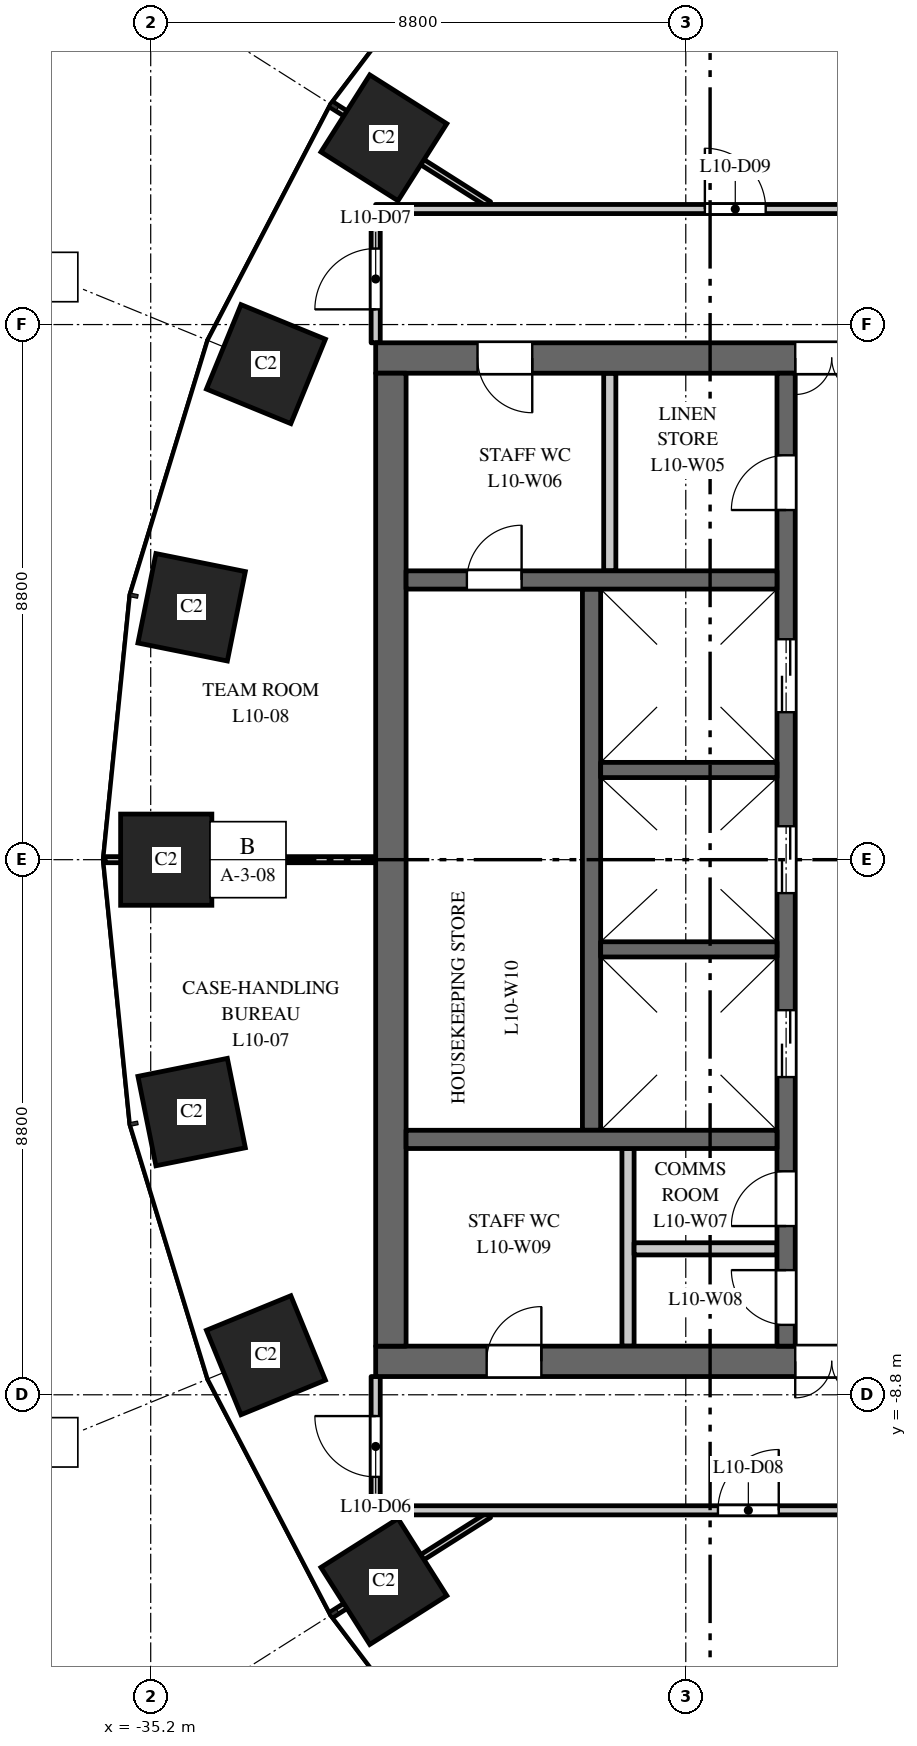
"""IFC4 building model, lengths in metres.
Left out: names, types, materials, properties, quantities, classifications, styles, units other than length and angle.
Written with IfcOpenShell. Run it as: python <this file> out.ifc"""

import sys

from ifc_helpers import new_model, si_unit, direction, frame, frame_2d, origin, origin_2d, place, context, subcontext, project, spatial, rectangle, extrude, element, fill, save


model = new_model("IFC4")
c1 = context("Model", 3, precision=1e-05, world=origin(), true_north=direction((0.0, 1.0)))
c2 = subcontext(c1, "Body", "Model", "MODEL_VIEW")
j1 = project(units=[si_unit("LENGTHUNIT", "METRE"), si_unit("PLANEANGLEUNIT", "RADIAN")], contexts=[c1])
p1 = place(None, origin())
s1 = spatial("IfcSite", under=j1, at=p1, CompositionType="ELEMENT")
p2 = place(p1, origin())
s2 = spatial("IfcBuilding", under=s1, at=p2, CompositionType="ELEMENT")
p3 = place(p2, frame((0.0, 0.0, 50.5)))
s3 = spatial("IfcBuildingStorey", under=s2, at=p3, CompositionType="ELEMENT", Elevation=50.5)
for number, where, z_axis, x_axis in (
    (1, (-31.365, 11.871, 0.0), (0.0, 0.0, 1.0), (-0.535, -0.845, 0.0)),
    (2, (-33.305, 8.149, 0.0), (0.0, 0.0, 1.0), (-0.379, -0.925, 0.0)),
    (3, (-34.527, 4.151, 0.0), (0.0, 0.0, 1.0), (-0.197, -0.98, 0.0)),
    (4, (-34.945, 0.0, 0.0), (0.0, 0.0, 1.0), (0.0, -1.0, 0.0)),
    (5, (-34.527, -4.151, 0.0), (0.0, 0.0, 1.0), (0.197, -0.98, 0.0)),
    (6, (-33.305, -8.149, 0.0), (0.0, 0.0, 1.0), (0.379, -0.925, 0.0)),
    (7, (-31.365, -11.871, 0.0), (0.0, 0.0, 1.0), (0.535, -0.845, 0.0)),
):
    element("IfcColumn", number, at=place(p3, frame(where, z_axis=z_axis, x_axis=x_axis)), inside=s3, PredefinedType="COLUMN", context=c2, shape_type="SweptSolid", body=[
        extrude(rectangle(XDim=1.5, YDim=1.5, at=origin_2d()), origin(), (0.0, 0.0, 1.0), 4.0),
    ])
p4 = place(p3, frame((-16.5, 8.25, 0.0), z_axis=(0.0, 0.0, 1.0), x_axis=(-1.0, 0.0, 0.0)))
e8 = element("IfcWall", 8, at=p4, inside=s3, PredefinedType="SHEAR", context=c2, shape_type="SweptSolid", body=[
    extrude(rectangle(XDim=15.0, YDim=0.5, at=frame_2d((7.5, 0.0))), origin(), (0.0, 0.0, 1.0), 3.7),
])
p5 = place(p4, frame((6.9, 0.0, 0.0)))
e9 = element("IfcOpeningElement", 9, at=p5, cuts=e8, PredefinedType="OPENING", context=c2, shape_type="SweptSolid", body=[
    extrude(rectangle(XDim=1.2, YDim=2.1, at=frame_2d((0.6, 1.05))), frame((0.0, 0.26, 0.0), z_axis=(0.0, -1.0, 0.0), x_axis=(1.0, 0.0, 0.0)), (0.0, 0.0, 1.0), 0.52),
])
p6 = place(p4, frame((12.425, 0.0, 0.0)))
e10 = element("IfcOpeningElement", 10, at=p6, cuts=e8, PredefinedType="OPENING", context=c2, shape_type="SweptSolid", body=[
    extrude(rectangle(XDim=0.9, YDim=2.1, at=frame_2d((0.45, 1.05))), frame((0.0, 0.26, 0.0), z_axis=(0.0, -1.0, 0.0), x_axis=(1.0, 0.0, 0.0)), (0.0, 0.0, 1.0), 0.52),
])
p7 = place(p3, frame((-16.5, -8.25, 0.0), z_axis=(0.0, 0.0, 1.0), x_axis=(-1.0, 0.0, 0.0)))
e11 = element("IfcWall", 11, at=p7, inside=s3, PredefinedType="SHEAR", context=c2, shape_type="SweptSolid", body=[
    extrude(rectangle(XDim=15.0, YDim=0.5, at=frame_2d((7.5, 0.0))), origin(), (0.0, 0.0, 1.0), 3.7),
])
p8 = place(p7, frame((6.9, 0.0, 0.0)))
e12 = element("IfcOpeningElement", 12, at=p8, cuts=e11, PredefinedType="OPENING", context=c2, shape_type="SweptSolid", body=[
    extrude(rectangle(XDim=1.2, YDim=2.1, at=frame_2d((0.6, 1.05))), frame((0.0, 0.26, 0.0), z_axis=(0.0, -1.0, 0.0), x_axis=(1.0, 0.0, 0.0)), (0.0, 0.0, 1.0), 0.52),
])
p9 = place(p7, frame((12.275, 0.0, 0.0)))
e13 = element("IfcOpeningElement", 13, at=p9, cuts=e11, PredefinedType="OPENING", context=c2, shape_type="SweptSolid", body=[
    extrude(rectangle(XDim=0.9, YDim=2.1, at=frame_2d((0.45, 1.05))), frame((0.0, 0.26, 0.0), z_axis=(0.0, -1.0, 0.0), x_axis=(1.0, 0.0, 0.0)), (0.0, 0.0, 1.0), 0.52),
])
p10 = place(p3, frame((-27.95, -4.45, 0.0), z_axis=(0.0, 0.0, 1.0), x_axis=(0.0, 1.0, 0.0)))
e14 = element("IfcWall", 14, at=p10, inside=s3, PredefinedType="SHEAR", context=c2, shape_type="SweptSolid", body=[
    extrude(rectangle(XDim=8.9, YDim=0.3, at=frame_2d((4.45, 0.0))), origin(), (0.0, 0.0, 1.0), 3.7),
])
p11 = place(p3, frame((-24.75, -8.0, 0.0), z_axis=(0.0, 0.0, 1.0), x_axis=(0.0, 1.0, 0.0)))
e15 = element("IfcWall", 15, at=p11, inside=s3, PredefinedType="SHEAR", context=c2, shape_type="SweptSolid", body=[
    extrude(rectangle(XDim=16.0, YDim=0.3, at=frame_2d((8.0, 0.0))), origin(), (0.0, 0.0, 1.0), 3.7),
])
p12 = place(p11, frame((4.425, 0.0, 0.0)))
e16 = element("IfcOpeningElement", 16, at=p12, cuts=e15, PredefinedType="OPENING", context=c2, shape_type="SweptSolid", body=[
    extrude(rectangle(XDim=1.1, YDim=2.1, at=frame_2d((0.55, 1.05))), frame((0.0, 0.16, 0.0), z_axis=(0.0, -1.0, 0.0), x_axis=(1.0, 0.0, 0.0)), (0.0, 0.0, 1.0), 0.32),
])
p13 = place(p11, frame((7.45, 0.0, 0.0)))
e17 = element("IfcOpeningElement", 17, at=p13, cuts=e15, PredefinedType="OPENING", context=c2, shape_type="SweptSolid", body=[
    extrude(rectangle(XDim=1.1, YDim=2.1, at=frame_2d((0.55, 1.05))), frame((0.0, 0.16, 0.0), z_axis=(0.0, -1.0, 0.0), x_axis=(1.0, 0.0, 0.0)), (0.0, 0.0, 1.0), 0.32),
])
p14 = place(p11, frame((10.425, 0.0, 0.0)))
e18 = element("IfcOpeningElement", 18, at=p14, cuts=e15, PredefinedType="OPENING", context=c2, shape_type="SweptSolid", body=[
    extrude(rectangle(XDim=1.2, YDim=2.1, at=frame_2d((0.6, 1.05))), frame((0.0, 0.16, 0.0), z_axis=(0.0, -1.0, 0.0), x_axis=(1.0, 0.0, 0.0)), (0.0, 0.0, 1.0), 0.32),
])
p15 = place(p11, frame((13.75, 0.0, 0.0)))
e19 = element("IfcOpeningElement", 19, at=p15, cuts=e15, PredefinedType="OPENING", context=c2, shape_type="SweptSolid", body=[
    extrude(rectangle(XDim=0.9, YDim=2.1, at=frame_2d((0.45, 1.05))), frame((0.0, 0.16, 0.0), z_axis=(0.0, -1.0, 0.0), x_axis=(1.0, 0.0, 0.0)), (0.0, 0.0, 1.0), 0.32),
])
p16 = place(p11, frame((1.975, 0.0, 0.0)))
e20 = element("IfcOpeningElement", 20, at=p16, cuts=e15, PredefinedType="OPENING", context=c2, shape_type="SweptSolid", body=[
    extrude(rectangle(XDim=0.9, YDim=2.1, at=frame_2d((0.45, 1.05))), frame((0.0, 0.16, 0.0), z_axis=(0.0, -1.0, 0.0), x_axis=(1.0, 0.0, 0.0)), (0.0, 0.0, 1.0), 0.32),
])
p17 = place(p11, frame((0.35, 0.0, 0.0)))
e21 = element("IfcOpeningElement", 21, at=p17, cuts=e15, PredefinedType="OPENING", context=c2, shape_type="SweptSolid", body=[
    extrude(rectangle(XDim=0.9, YDim=2.1, at=frame_2d((0.45, 1.05))), frame((0.0, 0.16, 0.0), z_axis=(0.0, -1.0, 0.0), x_axis=(1.0, 0.0, 0.0)), (0.0, 0.0, 1.0), 0.32),
])
p18 = place(p3, frame((-31.25, -8.0, 0.0), z_axis=(0.0, 0.0, 1.0), x_axis=(0.0, 1.0, 0.0)))
e22 = element("IfcWall", 22, at=p18, inside=s3, PredefinedType="SHEAR", context=c2, shape_type="SweptSolid", body=[
    extrude(rectangle(XDim=16.0, YDim=0.5, at=frame_2d((8.0, 0.0))), origin(), (0.0, 0.0, 1.0), 3.7),
])
p19 = place(p3, frame((-24.9, 4.6, 0.0), z_axis=(0.0, 0.0, 1.0), x_axis=(-1.0, 0.0, 0.0)))
e23 = element("IfcWall", 23, at=p19, inside=s3, PredefinedType="SHEAR", context=c2, shape_type="SweptSolid", body=[
    extrude(rectangle(XDim=6.1, YDim=0.3, at=frame_2d((3.05, 0.0))), origin(), (0.0, 0.0, 1.0), 3.7),
])
p20 = place(p19, frame((4.2, 0.0, 0.0)))
e24 = element("IfcOpeningElement", 24, at=p20, cuts=e23, PredefinedType="OPENING", context=c2, shape_type="SweptSolid", body=[
    extrude(rectangle(XDim=0.9, YDim=2.1, at=frame_2d((0.45, 1.05))), frame((0.0, 0.16, 0.0), z_axis=(0.0, -1.0, 0.0), x_axis=(1.0, 0.0, 0.0)), (0.0, 0.0, 1.0), 0.32),
])
for number, where, z_axis, x_axis in (
    (25, (-27.65, 4.75, 0.0), (0.0, 0.0, 1.0), (0.0, 1.0, 0.0)),
    (26, (-27.35, -8.0, 0.0), (0.0, 0.0, 1.0), (0.0, 1.0, 0.0)),
):
    element("IfcWall", number, at=place(p3, frame(where, z_axis=z_axis, x_axis=x_axis)), inside=s3, PredefinedType="PARTITIONING", context=c2, shape_type="SweptSolid", body=[
        extrude(rectangle(XDim=3.25, YDim=0.2, at=frame_2d((1.625, 0.0))), origin(), (0.0, 0.0, 1.0), 3.7),
    ])
p21 = place(p3, frame((-24.9, -6.4, 0.0), z_axis=(0.0, 0.0, 1.0), x_axis=(-1.0, 0.0, 0.0)))
e27 = element("IfcWall", 27, at=p21, inside=s3, PredefinedType="PARTITIONING", context=c2, shape_type="SweptSolid", body=[
    extrude(rectangle(XDim=2.35, YDim=0.2, at=frame_2d((1.175, 0.0))), origin(), (0.0, 0.0, 1.0), 3.7),
])
p22 = place(p3, frame((-24.9, -4.6, 0.0), z_axis=(0.0, 0.0, 1.0), x_axis=(-1.0, 0.0, 0.0)))
e28 = element("IfcWall", 28, at=p22, inside=s3, PredefinedType="SHEAR", context=c2, shape_type="SweptSolid", body=[
    extrude(rectangle(XDim=6.1, YDim=0.3, at=frame_2d((3.05, 0.0))), origin(), (0.0, 0.0, 1.0), 3.7),
])
for number, where, z_axis, x_axis in (
    (29, (-24.9, -1.475, 0.0), (0.0, 0.0, 1.0), (-1.0, 0.0, 0.0)),
    (30, (-24.9, 1.475, 0.0), (0.0, 0.0, 1.0), (-1.0, 0.0, 0.0)),
):
    element("IfcWall", number, at=place(p3, frame(where, z_axis=z_axis, x_axis=x_axis)), inside=s3, PredefinedType="SHEAR", context=c2, shape_type="SweptSolid", body=[
        extrude(rectangle(XDim=2.9, YDim=0.25, at=frame_2d((1.45, 0.0))), origin(), (0.0, 0.0, 1.0), 3.7),
    ])
p23 = place(p3, frame((-35.949, 0.0, 0.0), z_axis=(0.0, 0.0, 1.0), x_axis=(1.0, 0.0, 0.0)))
e31 = element("IfcWall", 31, at=p23, inside=s3, PredefinedType="PARTITIONING", context=c2, shape_type="SweptSolid", body=[
    extrude(rectangle(XDim=4.449, YDim=0.1, at=frame_2d((2.225, 0.0))), origin(), (0.0, 0.0, 1.0), 2.85),
])
for number, where, z_axis, x_axis in (
    (32, (-32.212, -12.408, 0.0), (0.0, 0.0, 1.0), (0.845, 0.535, 0.0)),
    (33, (-32.212, 12.408, 0.0), (0.0, 0.0, 1.0), (0.845, -0.535, 0.0)),
):
    element("IfcWall", number, at=place(p3, frame(where, z_axis=z_axis, x_axis=x_axis)), inside=s3, PredefinedType="PARTITIONING", context=c2, shape_type="SweptSolid", body=[
        extrude(rectangle(XDim=3.048, YDim=0.1, at=frame_2d((1.524, 0.0))), origin(), (0.0, 0.0, 1.0), 3.7),
    ])
p24 = place(p3, frame((-31.5, -10.7, 0.0), z_axis=(0.0, 0.0, 1.0), x_axis=(0.0, 1.0, 0.0)))
e34 = element("IfcWall", 34, at=p24, inside=s3, PredefinedType="PARTITIONING", context=c2, shape_type="SweptSolid", body=[
    extrude(rectangle(XDim=2.2, YDim=0.15, at=frame_2d((1.1, 0.0))), origin(), (0.0, 0.0, 1.0), 3.7),
])
p25 = place(p24, frame((0.55, 0.0, 0.0)))
e35 = element("IfcOpeningElement", 35, at=p25, cuts=e34, PredefinedType="OPENING", context=c2, shape_type="SweptSolid", body=[
    extrude(rectangle(XDim=1.0, YDim=2.1, at=frame_2d((0.5, 1.05))), frame((0.0, 0.085, 0.0), z_axis=(0.0, -1.0, 0.0), x_axis=(1.0, 0.0, 0.0)), (0.0, 0.0, 1.0), 0.17),
])
p26 = place(p3, frame((-31.5, -10.7, 0.0), z_axis=(0.0, 0.0, 1.0), x_axis=(1.0, 0.0, 0.0)))
e36 = element("IfcWall", 36, at=p26, inside=s3, PredefinedType="PARTITIONING", context=c2, shape_type="SweptSolid", body=[
    extrude(rectangle(XDim=15.0, YDim=0.15, at=frame_2d((7.5, 0.0))), origin(), (0.0, 0.0, 1.0), 3.1),
])
p27 = place(p26, frame((5.629, 0.0, 0.0)))
e37 = element("IfcOpeningElement", 37, at=p27, cuts=e36, PredefinedType="OPENING", context=c2, shape_type="SweptSolid", body=[
    extrude(rectangle(XDim=1.0, YDim=2.1, at=frame_2d((0.5, 1.05))), frame((0.0, 0.085, 0.0), z_axis=(0.0, -1.0, 0.0), x_axis=(1.0, 0.0, 0.0)), (0.0, 0.0, 1.0), 0.17),
])
p28 = place(p3, frame((-31.5, 8.5, 0.0), z_axis=(0.0, 0.0, 1.0), x_axis=(0.0, 1.0, 0.0)))
e38 = element("IfcWall", 38, at=p28, inside=s3, PredefinedType="PARTITIONING", context=c2, shape_type="SweptSolid", body=[
    extrude(rectangle(XDim=2.2, YDim=0.15, at=frame_2d((1.1, 0.0))), origin(), (0.0, 0.0, 1.0), 3.7),
])
p29 = place(p28, frame((0.55, 0.0, 0.0)))
e39 = element("IfcOpeningElement", 39, at=p29, cuts=e38, PredefinedType="OPENING", context=c2, shape_type="SweptSolid", body=[
    extrude(rectangle(XDim=1.0, YDim=2.1, at=frame_2d((0.5, 1.05))), frame((0.0, 0.085, 0.0), z_axis=(0.0, -1.0, 0.0), x_axis=(1.0, 0.0, 0.0)), (0.0, 0.0, 1.0), 0.17),
])
p30 = place(p3, frame((-31.5, 10.7, 0.0), z_axis=(0.0, 0.0, 1.0), x_axis=(1.0, 0.0, 0.0)))
e40 = element("IfcWall", 40, at=p30, inside=s3, PredefinedType="PARTITIONING", context=c2, shape_type="SweptSolid", body=[
    extrude(rectangle(XDim=15.0, YDim=0.15, at=frame_2d((7.5, 0.0))), origin(), (0.0, 0.0, 1.0), 3.1),
])
p31 = place(p30, frame((5.414, 0.0, 0.0)))
e41 = element("IfcOpeningElement", 41, at=p31, cuts=e40, PredefinedType="OPENING", context=c2, shape_type="SweptSolid", body=[
    extrude(rectangle(XDim=1.0, YDim=2.1, at=frame_2d((0.5, 1.05))), frame((0.0, 0.085, 0.0), z_axis=(0.0, -1.0, 0.0), x_axis=(1.0, 0.0, 0.0)), (0.0, 0.0, 1.0), 0.17),
])
p32 = place(p12, origin())
e42 = element("IfcDoor", 42, at=p32, inside=s3, OperationType="DOUBLE_DOOR_SLIDING", PredefinedType="DOOR", context=c2, shape_type="SweptSolid", body=[
    extrude(rectangle(XDim=1.1, YDim=2.1, at=frame_2d((0.55, 1.05))), frame((0.0, 0.025, 0.0), z_axis=(0.0, -1.0, 0.0), x_axis=(1.0, 0.0, 0.0)), (0.0, 0.0, 1.0), 0.05),
])
fill(e16, e42)
p33 = place(p13, origin())
e43 = element("IfcDoor", 43, at=p33, inside=s3, OperationType="DOUBLE_DOOR_SLIDING", PredefinedType="DOOR", context=c2, shape_type="SweptSolid", body=[
    extrude(rectangle(XDim=1.1, YDim=2.1, at=frame_2d((0.55, 1.05))), frame((0.0, 0.025, 0.0), z_axis=(0.0, -1.0, 0.0), x_axis=(1.0, 0.0, 0.0)), (0.0, 0.0, 1.0), 0.05),
])
fill(e17, e43)
p34 = place(p14, origin())
e44 = element("IfcDoor", 44, at=p34, inside=s3, OperationType="DOUBLE_DOOR_SLIDING", PredefinedType="DOOR", context=c2, shape_type="SweptSolid", body=[
    extrude(rectangle(XDim=1.2, YDim=2.1, at=frame_2d((0.6, 1.05))), frame((0.0, 0.025, 0.0), z_axis=(0.0, -1.0, 0.0), x_axis=(1.0, 0.0, 0.0)), (0.0, 0.0, 1.0), 0.05),
])
fill(e18, e44)
p35 = place(p5, origin())
e45 = element("IfcDoor", 45, at=p35, inside=s3, OperationType="DOUBLE_DOOR_DOUBLE_SWING", PredefinedType="DOOR", context=c2, shape_type="SweptSolid", body=[
    extrude(rectangle(XDim=1.2, YDim=2.1, at=frame_2d((0.6, 1.05))), frame((0.0, 0.025, 0.0), z_axis=(0.0, -1.0, 0.0), x_axis=(1.0, 0.0, 0.0)), (0.0, 0.0, 1.0), 0.05),
])
fill(e9, e45)
p36 = place(p8, origin())
e46 = element("IfcDoor", 46, at=p36, inside=s3, OperationType="DOUBLE_DOOR_DOUBLE_SWING", PredefinedType="DOOR", context=c2, shape_type="SweptSolid", body=[
    extrude(rectangle(XDim=1.2, YDim=2.1, at=frame_2d((0.6, 1.05))), frame((0.0, 0.025, 0.0), z_axis=(0.0, -1.0, 0.0), x_axis=(1.0, 0.0, 0.0)), (0.0, 0.0, 1.0), 0.05),
])
fill(e12, e46)
p37 = place(p15, origin())
e47 = element("IfcDoor", 47, at=p37, inside=s3, OperationType="SINGLE_SWING_RIGHT", PredefinedType="DOOR", context=c2, shape_type="SweptSolid", body=[
    extrude(rectangle(XDim=0.9, YDim=2.1, at=frame_2d((0.45, 1.05))), frame((0.0, 0.025, 0.0), z_axis=(0.0, -1.0, 0.0), x_axis=(1.0, 0.0, 0.0)), (0.0, 0.0, 1.0), 0.05),
])
fill(e19, e47)
p38 = place(p6, origin())
e48 = element("IfcDoor", 48, at=p38, inside=s3, OperationType="SINGLE_SWING_RIGHT", PredefinedType="DOOR", context=c2, shape_type="SweptSolid", body=[
    extrude(rectangle(XDim=0.9, YDim=2.1, at=frame_2d((0.45, 1.05))), frame((0.0, 0.025, 0.0), z_axis=(0.0, -1.0, 0.0), x_axis=(1.0, 0.0, 0.0)), (0.0, 0.0, 1.0), 0.05),
])
fill(e10, e48)
p39 = place(p16, origin())
e49 = element("IfcDoor", 49, at=p39, inside=s3, OperationType="SINGLE_SWING_RIGHT", PredefinedType="DOOR", context=c2, shape_type="SweptSolid", body=[
    extrude(rectangle(XDim=0.9, YDim=2.1, at=frame_2d((0.45, 1.05))), frame((0.0, 0.025, 0.0), z_axis=(0.0, -1.0, 0.0), x_axis=(1.0, 0.0, 0.0)), (0.0, 0.0, 1.0), 0.05),
])
fill(e20, e49)
p40 = place(p17, origin())
e50 = element("IfcDoor", 50, at=p40, inside=s3, OperationType="SINGLE_SWING_LEFT", PredefinedType="DOOR", context=c2, shape_type="SweptSolid", body=[
    extrude(rectangle(XDim=0.9, YDim=2.1, at=frame_2d((0.45, 1.05))), frame((0.0, 0.025, 0.0), z_axis=(0.0, -1.0, 0.0), x_axis=(1.0, 0.0, 0.0)), (0.0, 0.0, 1.0), 0.05),
])
fill(e21, e50)
p41 = place(p9, origin())
e51 = element("IfcDoor", 51, at=p41, inside=s3, OperationType="SINGLE_SWING_LEFT", PredefinedType="DOOR", context=c2, shape_type="SweptSolid", body=[
    extrude(rectangle(XDim=0.9, YDim=2.1, at=frame_2d((0.45, 1.05))), frame((0.0, 0.025, 0.0), z_axis=(0.0, -1.0, 0.0), x_axis=(1.0, 0.0, 0.0)), (0.0, 0.0, 1.0), 0.05),
])
fill(e13, e51)
p42 = place(p20, origin())
e52 = element("IfcDoor", 52, at=p42, inside=s3, OperationType="SINGLE_SWING_LEFT", PredefinedType="DOOR", context=c2, shape_type="SweptSolid", body=[
    extrude(rectangle(XDim=0.9, YDim=2.1, at=frame_2d((0.45, 1.05))), frame((0.0, 0.025, 0.0), z_axis=(0.0, -1.0, 0.0), x_axis=(1.0, 0.0, 0.0)), (0.0, 0.0, 1.0), 0.05),
])
fill(e24, e52)
p43 = place(p25, origin())
e53 = element("IfcDoor", 53, at=p43, inside=s3, OperationType="SINGLE_SWING_RIGHT", PredefinedType="DOOR", context=c2, shape_type="SweptSolid", body=[
    extrude(rectangle(XDim=1.0, YDim=2.1, at=frame_2d((0.5, 1.05))), frame((0.0, 0.025, 0.0), z_axis=(0.0, -1.0, 0.0), x_axis=(1.0, 0.0, 0.0)), (0.0, 0.0, 1.0), 0.05),
])
fill(e35, e53)
p44 = place(p29, origin())
e54 = element("IfcDoor", 54, at=p44, inside=s3, OperationType="SINGLE_SWING_LEFT", PredefinedType="DOOR", context=c2, shape_type="SweptSolid", body=[
    extrude(rectangle(XDim=1.0, YDim=2.1, at=frame_2d((0.5, 1.05))), frame((0.0, 0.025, 0.0), z_axis=(0.0, -1.0, 0.0), x_axis=(1.0, 0.0, 0.0)), (0.0, 0.0, 1.0), 0.05),
])
fill(e39, e54)
p45 = place(p27, origin())
e55 = element("IfcDoor", 55, at=p45, inside=s3, OperationType="SINGLE_SWING_RIGHT", PredefinedType="DOOR", context=c2, shape_type="SweptSolid", body=[
    extrude(rectangle(XDim=1.0, YDim=2.1, at=frame_2d((0.5, 1.05))), frame((0.0, 0.025, 0.0), z_axis=(0.0, -1.0, 0.0), x_axis=(1.0, 0.0, 0.0)), (0.0, 0.0, 1.0), 0.05),
])
fill(e37, e55)
p46 = place(p31, origin())
e56 = element("IfcDoor", 56, at=p46, inside=s3, OperationType="SINGLE_SWING_LEFT", PredefinedType="DOOR", context=c2, shape_type="SweptSolid", body=[
    extrude(rectangle(XDim=1.0, YDim=2.1, at=frame_2d((0.5, 1.05))), frame((0.0, 0.025, 0.0), z_axis=(0.0, -1.0, 0.0), x_axis=(1.0, 0.0, 0.0)), (0.0, 0.0, 1.0), 0.05),
])
fill(e41, e56)
save(model, sys.argv[1])
